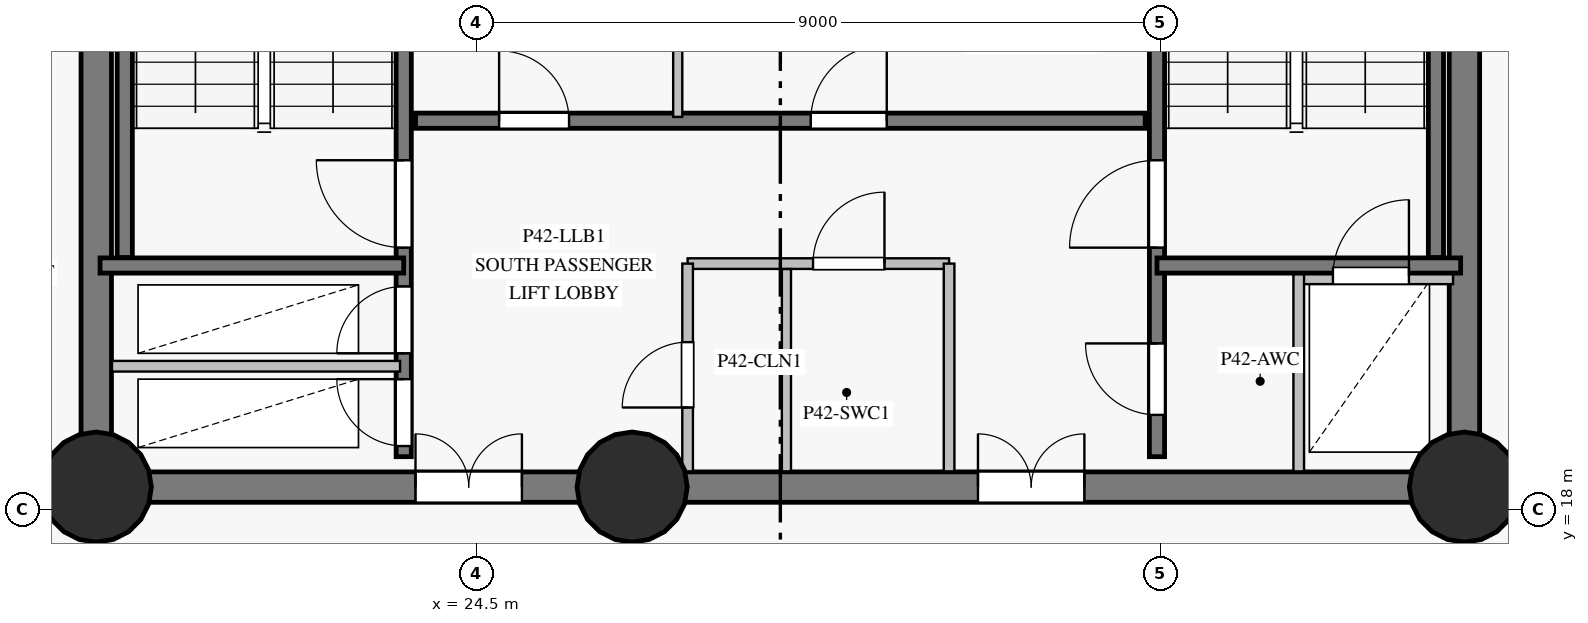
"""IFC4 building model, lengths in metres.
Left out: names, types, materials, properties, quantities, classifications, styles, units other than length and angle.
Written with IfcOpenShell. Run it as: python <this file> out.ifc"""

import sys

from ifc_helpers import new_model, si_unit, direction, frame, frame_2d, origin, origin_with_axes, origin_2d, place, context, subcontext, project, spatial, rectangle, circle, extrude, source, transform, mapped, element, fill, save


model = new_model("IFC4")
c1 = context("Model", 3, precision=1e-05, world=origin(), true_north=direction((0.0, 1.0)))
c2 = subcontext(c1, "Body", "Model", "MODEL_VIEW")
j1 = project(units=[si_unit("LENGTHUNIT", "METRE"), si_unit("PLANEANGLEUNIT", "RADIAN")], contexts=[c1])
p1 = place(None, origin())
s1 = spatial("IfcSite", under=j1, at=p1, CompositionType="ELEMENT")
p2 = place(p1, origin())
s2 = spatial("IfcBuilding", under=s1, at=p2, CompositionType="ELEMENT")
p3 = place(p2, frame((0.0, 0.0, 148.05)))
s3 = spatial("IfcBuildingStorey", under=s2, at=p3, CompositionType="ELEMENT", Elevation=148.05)
p4 = place(p3, frame((19.5, 18.3, 0.0), z_axis=(0.0, 0.0, 1.0), x_axis=(1.0, 0.0, 0.0)))
e1 = element("IfcWall", 1, at=p4, inside=s3, PredefinedType="SHEAR", context=c2, shape_type="SweptSolid", body=[
    extrude(rectangle(XDim=7.05, YDim=0.4, at=frame_2d((3.525, 0.0))), origin(), (0.0, 0.0, 1.0), 4.275),
])
p5 = place(p4, frame((4.2, 0.0, 0.0)))
e2 = element("IfcOpeningElement", 2, at=p5, cuts=e1, PredefinedType="OPENING", context=c2, shape_type="SweptSolid", body=[
    extrude(rectangle(XDim=1.4, YDim=2.2, at=frame_2d((0.7, 1.1))), frame((0.0, 0.21, 0.0), z_axis=(0.0, -1.0, 0.0), x_axis=(1.0, 0.0, 0.0)), (0.0, 0.0, 1.0), 0.42),
])
p6 = place(p3, frame((26.55, 18.3, 0.0), z_axis=(0.0, 0.0, 1.0), x_axis=(1.0, 0.0, 0.0)))
e3 = element("IfcWall", 3, at=p6, inside=s3, PredefinedType="SHEAR", context=c2, shape_type="SweptSolid", body=[
    extrude(rectangle(XDim=10.95, YDim=0.4, at=frame_2d((5.475, 0.0))), origin(), (0.0, 0.0, 1.0), 4.275),
])
p7 = place(p6, frame((4.55, 0.0, 0.0)))
e4 = element("IfcOpeningElement", 4, at=p7, cuts=e3, PredefinedType="OPENING", context=c2, shape_type="SweptSolid", body=[
    extrude(rectangle(XDim=1.4, YDim=2.2, at=frame_2d((0.7, 1.1))), frame((0.0, 0.21, 0.0), z_axis=(0.0, -1.0, 0.0), x_axis=(1.0, 0.0, 0.0)), (0.0, 0.0, 1.0), 0.42),
])
p8 = place(p3, frame((37.5, 18.3, 0.0), z_axis=(0.0, 0.0, 1.0), x_axis=(0.0, 1.0, 0.0)))
e5 = element("IfcWall", 5, at=p8, inside=s3, PredefinedType="SHEAR", context=c2, shape_type="SweptSolid", body=[
    extrude(rectangle(XDim=16.4, YDim=0.4, at=frame_2d((8.2, 0.0))), origin(), (0.0, 0.0, 1.0), 4.275),
])
p9 = place(p8, frame((14.15, 0.0, 0.0)))
e6 = element("IfcOpeningElement", 6, at=p9, cuts=e5, PredefinedType="OPENING", context=c2, shape_type="SweptSolid", body=[
    extrude(rectangle(XDim=1.2, YDim=2.15, at=frame_2d((0.6, 1.075))), frame((0.0, 0.21, 0.0), z_axis=(0.0, -1.0, 0.0), x_axis=(1.0, 0.0, 0.0)), (0.0, 0.0, 1.0), 0.42),
])
p10 = place(p3, frame((19.5, 34.7, 0.0), z_axis=(0.0, 0.0, 1.0), x_axis=(0.0, -1.0, 0.0)))
e7 = element("IfcWall", 7, at=p10, inside=s3, PredefinedType="SHEAR", context=c2, shape_type="SweptSolid", body=[
    extrude(rectangle(XDim=16.4, YDim=0.4, at=frame_2d((8.2, 0.0))), origin(), (0.0, 0.0, 1.0), 4.275),
])
p11 = place(p10, frame((3.1, 0.0, 0.0)))
e8 = element("IfcOpeningElement", 8, at=p11, cuts=e7, PredefinedType="OPENING", context=c2, shape_type="SweptSolid", body=[
    extrude(rectangle(XDim=1.1, YDim=2.15, at=frame_2d((0.55, 1.075))), frame((0.0, 0.21, 0.0), z_axis=(0.0, -1.0, 0.0), x_axis=(1.0, 0.0, 0.0)), (0.0, 0.0, 1.0), 0.42),
])
m1 = source(origin_with_axes(), c2, "Body", "SweptSolid", [
    extrude(circle(Radius=0.725, at=origin_2d()), origin(), (0.0, 0.0, 1.0), 4.5),
])
for number, where, z_axis, x_axis in (
    (9, (19.5, 18.3, 0.0), (0.0, 0.0, 1.0), (1.0, 0.0, 0.0)),
    (10, (26.55, 18.3, 0.0), (0.0, 0.0, 1.0), (1.0, 0.0, 0.0)),
    (11, (37.5, 18.3, 0.0), (0.0, 0.0, 1.0), (1.0, 0.0, 0.0)),
):
    element("IfcColumn", number, at=place(p3, frame(where, z_axis=z_axis, x_axis=x_axis)), inside=s3, PredefinedType="COLUMN", context=c2, shape_type="MappedRepresentation", body=[
        mapped(m1, transform((0.0, 0.0, 0.0), scale=1.0)),
    ])
p12 = place(p3, frame((35.32, 21.08, 0.0), z_axis=(0.0, 0.0, 1.0), x_axis=(1.0, 0.0, 0.0)))
e12 = element("IfcWall", 12, at=p12, inside=s3, PredefinedType="SHEAR", context=c2, shape_type="SweptSolid", body=[
    extrude(rectangle(XDim=2.03, YDim=0.22, at=frame_2d((1.015, 0.0))), origin(), (0.0, 0.0, 1.0), 2.45),
])
p13 = place(p12, frame((0.45, 0.0, 0.0)))
e13 = element("IfcOpeningElement", 13, at=p13, cuts=e12, PredefinedType="OPENING", context=c2, shape_type="SweptSolid", body=[
    extrude(rectangle(XDim=1.0, YDim=2.05, at=frame_2d((0.5, 1.025))), frame((0.0, 0.12, 0.0), z_axis=(0.0, -1.0, 0.0), x_axis=(1.0, 0.0, 0.0)), (0.0, 0.0, 1.0), 0.24),
])
p14 = place(p3, frame((23.545, 18.7, 0.0), z_axis=(0.0, 0.0, 1.0), x_axis=(0.0, 1.0, 0.0)))
e14 = element("IfcWall", 14, at=p14, inside=s3, PredefinedType="SHEAR", context=c2, shape_type="SweptSolid", body=[
    extrude(rectangle(XDim=15.6, YDim=0.2, at=frame_2d((7.8, 0.0))), origin(), (0.0, 0.0, 1.0), 4.275),
])
p15 = place(p14, frame((2.75, 0.0, 0.0)))
e15 = element("IfcOpeningElement", 15, at=p15, cuts=e14, PredefinedType="OPENING", context=c2, shape_type="SweptSolid", body=[
    extrude(rectangle(XDim=1.15, YDim=2.15, at=frame_2d((0.575, 1.075))), frame((0.0, 0.11, 0.0), z_axis=(0.0, -1.0, 0.0), x_axis=(1.0, 0.0, 0.0)), (0.0, 0.0, 1.0), 0.22),
])
p16 = place(p14, frame((0.14, 0.0, 0.0)))
e16 = element("IfcOpeningElement", 16, at=p16, cuts=e14, PredefinedType="OPENING", context=c2, shape_type="SweptSolid", body=[
    extrude(rectangle(XDim=0.88, YDim=2.1, at=frame_2d((0.44, 1.05))), frame((0.0, 0.11, 0.0), z_axis=(0.0, -1.0, 0.0), x_axis=(1.0, 0.0, 0.0)), (0.0, 0.0, 1.0), 0.22),
])
p17 = place(p14, frame((1.36, 0.0, 0.0)))
e17 = element("IfcOpeningElement", 17, at=p17, cuts=e14, PredefinedType="OPENING", context=c2, shape_type="SweptSolid", body=[
    extrude(rectangle(XDim=0.88, YDim=2.1, at=frame_2d((0.44, 1.05))), frame((0.0, 0.11, 0.0), z_axis=(0.0, -1.0, 0.0), x_axis=(1.0, 0.0, 0.0)), (0.0, 0.0, 1.0), 0.22),
])
p18 = place(p14, frame((12.1, 0.0, 0.0)))
e18 = element("IfcOpeningElement", 18, at=p18, cuts=e14, PredefinedType="OPENING", context=c2, shape_type="SweptSolid", body=[
    extrude(rectangle(XDim=1.12, YDim=2.15, at=frame_2d((0.56, 1.075))), frame((0.0, 0.11, 0.0), z_axis=(0.0, -1.0, 0.0), x_axis=(1.0, 0.0, 0.0)), (0.0, 0.0, 1.0), 0.22),
])
p19 = place(p14, frame((14.05, 0.0, 0.0)))
e19 = element("IfcOpeningElement", 19, at=p19, cuts=e14, PredefinedType="OPENING", context=c2, shape_type="SweptSolid", body=[
    extrude(rectangle(XDim=1.12, YDim=2.15, at=frame_2d((0.56, 1.075))), frame((0.0, 0.11, 0.0), z_axis=(0.0, -1.0, 0.0), x_axis=(1.0, 0.0, 0.0)), (0.0, 0.0, 1.0), 0.22),
])
p20 = place(p3, frame((33.455, 18.7, 0.0), z_axis=(0.0, 0.0, 1.0), x_axis=(0.0, 1.0, 0.0)))
e20 = element("IfcWall", 20, at=p20, inside=s3, PredefinedType="SHEAR", context=c2, shape_type="SweptSolid", body=[
    extrude(rectangle(XDim=15.6, YDim=0.2, at=frame_2d((7.8, 0.0))), origin(), (0.0, 0.0, 1.0), 4.275),
])
p21 = place(p20, frame((2.75, 0.0, 0.0)))
e21 = element("IfcOpeningElement", 21, at=p21, cuts=e20, PredefinedType="OPENING", context=c2, shape_type="SweptSolid", body=[
    extrude(rectangle(XDim=1.15, YDim=2.15, at=frame_2d((0.575, 1.075))), frame((0.0, 0.11, 0.0), z_axis=(0.0, -1.0, 0.0), x_axis=(1.0, 0.0, 0.0)), (0.0, 0.0, 1.0), 0.22),
])
p22 = place(p20, frame((0.55, 0.0, 0.0)))
e22 = element("IfcOpeningElement", 22, at=p22, cuts=e20, PredefinedType="OPENING", context=c2, shape_type="SweptSolid", body=[
    extrude(rectangle(XDim=0.94, YDim=2.1, at=frame_2d((0.47, 1.05))), frame((0.0, 0.11, 0.0), z_axis=(0.0, -1.0, 0.0), x_axis=(1.0, 0.0, 0.0)), (0.0, 0.0, 1.0), 0.22),
])
p23 = place(p3, frame((23.7, 23.12, 0.0), z_axis=(0.0, 0.0, 1.0), x_axis=(1.0, 0.0, 0.0)))
e23 = element("IfcWall", 23, at=p23, inside=s3, PredefinedType="SHEAR", context=c2, shape_type="SweptSolid", body=[
    extrude(rectangle(XDim=9.6, YDim=0.2, at=frame_2d((4.8, 0.0))), origin(), (0.0, 0.0, 1.0), 4.275),
])
p24 = place(p23, frame((1.1, 0.0, 0.0)))
e24 = element("IfcOpeningElement", 24, at=p24, cuts=e23, PredefinedType="OPENING", context=c2, shape_type="SweptSolid", body=[
    extrude(rectangle(XDim=0.92, YDim=2.1, at=frame_2d((0.46, 1.05))), frame((0.0, 0.11, 0.0), z_axis=(0.0, -1.0, 0.0), x_axis=(1.0, 0.0, 0.0)), (0.0, 0.0, 1.0), 0.22),
])
p25 = place(p23, frame((5.2, 0.0, 0.0)))
e25 = element("IfcOpeningElement", 25, at=p25, cuts=e23, PredefinedType="OPENING", context=c2, shape_type="SweptSolid", body=[
    extrude(rectangle(XDim=1.0, YDim=2.15, at=frame_2d((0.5, 1.075))), frame((0.0, 0.11, 0.0), z_axis=(0.0, -1.0, 0.0), x_axis=(1.0, 0.0, 0.0)), (0.0, 0.0, 1.0), 0.22),
])
for number, where, z_axis, x_axis in (
    (26, (19.875, 21.32, 0.0), (0.0, 0.0, 1.0), (0.0, 1.0, 0.0)),
    (27, (37.125, 21.32, 0.0), (0.0, 0.0, 1.0), (0.0, 1.0, 0.0)),
):
    element("IfcWall", number, at=place(p3, frame(where, z_axis=z_axis, x_axis=x_axis)), inside=s3, PredefinedType="SHEAR", context=c2, shape_type="SweptSolid", body=[
        extrude(rectangle(XDim=7.5, YDim=0.2, at=frame_2d((3.75, 0.0))), origin(), (0.0, 0.0, 1.0), 4.275),
    ])
for number, where, z_axis, x_axis in (
    (28, (33.455, 21.215, 0.0), (0.0, 0.0, 1.0), (1.0, 0.0, 0.0)),
    (29, (19.55, 21.215, 0.0), (0.0, 0.0, 1.0), (1.0, 0.0, 0.0)),
):
    element("IfcWall", number, at=place(p3, frame(where, z_axis=z_axis, x_axis=x_axis)), inside=s3, PredefinedType="SHEAR", context=c2, shape_type="SweptSolid", body=[
        extrude(rectangle(XDim=3.995, YDim=0.2, at=frame_2d((1.998, 0.0))), origin(), (0.0, 0.0, 1.0), 4.275),
    ])
p26 = place(p3, frame((19.707, 19.89, 0.0), z_axis=(0.0, 0.0, 1.0), x_axis=(1.0, 0.0, 0.0)))
e30 = element("IfcWall", 30, at=p26, inside=s3, PredefinedType="PARTITIONING", context=c2, shape_type="SweptSolid", body=[
    extrude(rectangle(XDim=3.79, YDim=0.14, at=frame_2d((1.895, 0.0))), origin(), (0.0, 0.0, 1.0), 4.275),
])
p27 = place(p3, frame((27.28, 21.24, 0.0), z_axis=(0.0, 0.0, 1.0), x_axis=(1.0, 0.0, 0.0)))
e31 = element("IfcWall", 31, at=p27, inside=s3, PredefinedType="PARTITIONING", context=c2, shape_type="SweptSolid", body=[
    extrude(rectangle(XDim=3.44, YDim=0.14, at=frame_2d((1.72, 0.0))), origin(), (0.0, 0.0, 1.0), 4.275),
])
p28 = place(p27, frame((1.65, 0.0, 0.0)))
e32 = element("IfcOpeningElement", 32, at=p28, cuts=e31, PredefinedType="OPENING", context=c2, shape_type="SweptSolid", body=[
    extrude(rectangle(XDim=0.94, YDim=2.1, at=frame_2d((0.47, 1.05))), frame((0.0, 0.08, 0.0), z_axis=(0.0, -1.0, 0.0), x_axis=(1.0, 0.0, 0.0)), (0.0, 0.0, 1.0), 0.16),
])
p29 = place(p3, frame((27.15, 23.17, 0.0), z_axis=(0.0, 0.0, 1.0), x_axis=(0.0, 1.0, 0.0)))
e33 = element("IfcWall", 33, at=p29, inside=s3, PredefinedType="PARTITIONING", context=c2, shape_type="SweptSolid", body=[
    extrude(rectangle(XDim=2.7, YDim=0.12, at=frame_2d((1.35, 0.0))), origin(), (0.0, 0.0, 1.0), 4.275),
])
p30 = place(p3, frame((27.28, 18.507, 0.0), z_axis=(0.0, 0.0, 1.0), x_axis=(0.0, 1.0, 0.0)))
e34 = element("IfcWall", 34, at=p30, inside=s3, PredefinedType="PARTITIONING", context=c2, shape_type="SweptSolid", body=[
    extrude(rectangle(XDim=2.733, YDim=0.14, at=frame_2d((1.366, 0.0))), origin(), (0.0, 0.0, 1.0), 4.275),
])
p31 = place(p30, frame((0.84, 0.0, 0.0)))
e35 = element("IfcOpeningElement", 35, at=p31, cuts=e34, PredefinedType="OPENING", context=c2, shape_type="SweptSolid", body=[
    extrude(rectangle(XDim=0.86, YDim=2.1, at=frame_2d((0.43, 1.05))), frame((0.0, 0.08, 0.0), z_axis=(0.0, -1.0, 0.0), x_axis=(1.0, 0.0, 0.0)), (0.0, 0.0, 1.0), 0.16),
])
p32 = place(p3, frame((30.72, 18.507, 0.0), z_axis=(0.0, 0.0, 1.0), x_axis=(0.0, 1.0, 0.0)))
e36 = element("IfcWall", 36, at=p32, inside=s3, PredefinedType="PARTITIONING", context=c2, shape_type="SweptSolid", body=[
    extrude(rectangle(XDim=2.733, YDim=0.14, at=frame_2d((1.366, 0.0))), origin(), (0.0, 0.0, 1.0), 4.275),
])
p33 = place(p3, frame((28.58, 18.507, 0.0), z_axis=(0.0, 0.0, 1.0), x_axis=(0.0, 1.0, 0.0)))
e37 = element("IfcWall", 37, at=p33, inside=s3, PredefinedType="PARTITIONING", context=c2, shape_type="SweptSolid", body=[
    extrude(rectangle(XDim=2.662, YDim=0.12, at=frame_2d((1.331, 0.0))), origin(), (0.0, 0.0, 1.0), 4.275),
])
p34 = place(p3, frame((35.32, 18.507, 0.0), z_axis=(0.0, 0.0, 1.0), x_axis=(0.0, 1.0, 0.0)))
e38 = element("IfcWall", 38, at=p34, inside=s3, PredefinedType="PARTITIONING", context=c2, shape_type="SweptSolid", body=[
    extrude(rectangle(XDim=2.592, YDim=0.14, at=frame_2d((1.296, 0.0))), origin(), (0.0, 0.0, 1.0), 4.275),
])
m2 = source(origin_with_axes(), c2, "Body", "SweptSolid", [
    extrude(rectangle(XDim=1.0, YDim=2.05, at=frame_2d((0.5, 1.025))), frame((0.0, 0.025, 0.0), z_axis=(0.0, -1.0, 0.0), x_axis=(1.0, 0.0, 0.0)), (0.0, 0.0, 1.0), 0.05),
])
p35 = place(p13, origin())
e39 = element("IfcDoor", 39, at=p35, inside=s3, OperationType="SINGLE_SWING_RIGHT", PredefinedType="TRAPDOOR", context=c2, shape_type="MappedRepresentation", body=[
    mapped(m2, transform((0.0, 0.0, 0.0), scale=1.0)),
])
fill(e13, e39)
m3 = source(origin_with_axes(), c2, "Body", "SweptSolid", [
    extrude(rectangle(XDim=1.15, YDim=2.15, at=frame_2d((0.575, 1.075))), frame((0.0, 0.025, 0.0), z_axis=(0.0, -1.0, 0.0), x_axis=(1.0, 0.0, 0.0)), (0.0, 0.0, 1.0), 0.05),
])
p36 = place(p15, origin())
e40 = element("IfcDoor", 40, at=p36, inside=s3, OperationType="SINGLE_SWING_RIGHT", PredefinedType="DOOR", context=c2, shape_type="MappedRepresentation", body=[
    mapped(m3, transform((0.0, 0.0, 0.0), scale=1.0)),
])
fill(e15, e40)
p37 = place(p21, origin())
e41 = element("IfcDoor", 41, at=p37, inside=s3, OperationType="SINGLE_SWING_LEFT", PredefinedType="DOOR", context=c2, shape_type="MappedRepresentation", body=[
    mapped(m3, transform((0.0, 0.0, 0.0), scale=1.0)),
])
fill(e21, e41)
m4 = source(origin_with_axes(), c2, "Body", "SweptSolid", [
    extrude(rectangle(XDim=0.88, YDim=2.1, at=frame_2d((0.44, 1.05))), frame((0.0, 0.025, 0.0), z_axis=(0.0, -1.0, 0.0), x_axis=(1.0, 0.0, 0.0)), (0.0, 0.0, 1.0), 0.05),
])
p38 = place(p16, origin())
e42 = element("IfcDoor", 42, at=p38, inside=s3, OperationType="SINGLE_SWING_RIGHT", PredefinedType="DOOR", context=c2, shape_type="MappedRepresentation", body=[
    mapped(m4, transform((0.0, 0.0, 0.0), scale=1.0)),
])
fill(e16, e42)
p39 = place(p17, origin())
e43 = element("IfcDoor", 43, at=p39, inside=s3, OperationType="SINGLE_SWING_LEFT", PredefinedType="DOOR", context=c2, shape_type="MappedRepresentation", body=[
    mapped(m4, transform((0.0, 0.0, 0.0), scale=1.0)),
])
fill(e17, e43)
m5 = source(origin_with_axes(), c2, "Body", "SweptSolid", [
    extrude(rectangle(XDim=1.4, YDim=2.2, at=frame_2d((0.7, 1.1))), frame((0.0, 0.025, 0.0), z_axis=(0.0, -1.0, 0.0), x_axis=(1.0, 0.0, 0.0)), (0.0, 0.0, 1.0), 0.05),
])
p40 = place(p5, origin())
e44 = element("IfcDoor", 44, at=p40, inside=s3, OperationType="DOUBLE_DOOR_SINGLE_SWING", PredefinedType="DOOR", context=c2, shape_type="MappedRepresentation", body=[
    mapped(m5, transform((0.0, 0.0, 0.0), scale=1.0)),
])
fill(e2, e44)
p41 = place(p7, origin())
e45 = element("IfcDoor", 45, at=p41, inside=s3, OperationType="DOUBLE_DOOR_SINGLE_SWING", PredefinedType="DOOR", context=c2, shape_type="MappedRepresentation", body=[
    mapped(m5, transform((0.0, 0.0, 0.0), scale=1.0)),
])
fill(e4, e45)
m6 = source(origin_with_axes(), c2, "Body", "SweptSolid", [
    extrude(rectangle(XDim=0.94, YDim=2.1, at=frame_2d((0.47, 1.05))), frame((0.0, 0.025, 0.0), z_axis=(0.0, -1.0, 0.0), x_axis=(1.0, 0.0, 0.0)), (0.0, 0.0, 1.0), 0.05),
])
p42 = place(p22, origin())
e46 = element("IfcDoor", 46, at=p42, inside=s3, OperationType="SINGLE_SWING_RIGHT", PredefinedType="DOOR", context=c2, shape_type="MappedRepresentation", body=[
    mapped(m6, transform((0.0, 0.0, 0.0), scale=1.0)),
])
fill(e22, e46)
m7 = source(origin_with_axes(), c2, "Body", "SweptSolid", [
    extrude(rectangle(XDim=0.86, YDim=2.1, at=frame_2d((0.43, 1.05))), frame((0.0, 0.025, 0.0), z_axis=(0.0, -1.0, 0.0), x_axis=(1.0, 0.0, 0.0)), (0.0, 0.0, 1.0), 0.05),
])
p43 = place(p31, origin())
e47 = element("IfcDoor", 47, at=p43, inside=s3, OperationType="SINGLE_SWING_LEFT", PredefinedType="DOOR", context=c2, shape_type="MappedRepresentation", body=[
    mapped(m7, transform((0.0, 0.0, 0.0), scale=1.0)),
])
fill(e35, e47)
p44 = place(p28, origin())
e48 = element("IfcDoor", 48, at=p44, inside=s3, OperationType="SINGLE_SWING_RIGHT", PredefinedType="DOOR", context=c2, shape_type="MappedRepresentation", body=[
    mapped(m6, transform((0.0, 0.0, 0.0), scale=1.0)),
])
fill(e32, e48)
m8 = source(origin_with_axes(), c2, "Body", "SweptSolid", [
    extrude(rectangle(XDim=0.92, YDim=2.1, at=frame_2d((0.46, 1.05))), frame((0.0, 0.025, 0.0), z_axis=(0.0, -1.0, 0.0), x_axis=(1.0, 0.0, 0.0)), (0.0, 0.0, 1.0), 0.05),
])
p45 = place(p24, origin())
e49 = element("IfcDoor", 49, at=p45, inside=s3, OperationType="SINGLE_SWING_LEFT", PredefinedType="DOOR", context=c2, shape_type="MappedRepresentation", body=[
    mapped(m8, transform((0.0, 0.0, 0.0), scale=1.0)),
])
fill(e24, e49)
m9 = source(origin_with_axes(), c2, "Body", "SweptSolid", [
    extrude(rectangle(XDim=1.0, YDim=2.15, at=frame_2d((0.5, 1.075))), frame((0.0, 0.025, 0.0), z_axis=(0.0, -1.0, 0.0), x_axis=(1.0, 0.0, 0.0)), (0.0, 0.0, 1.0), 0.05),
])
p46 = place(p25, origin())
e50 = element("IfcDoor", 50, at=p46, inside=s3, OperationType="SINGLE_SWING_RIGHT", PredefinedType="DOOR", context=c2, shape_type="MappedRepresentation", body=[
    mapped(m9, transform((0.0, 0.0, 0.0), scale=1.0)),
])
fill(e25, e50)
save(model, sys.argv[1])
